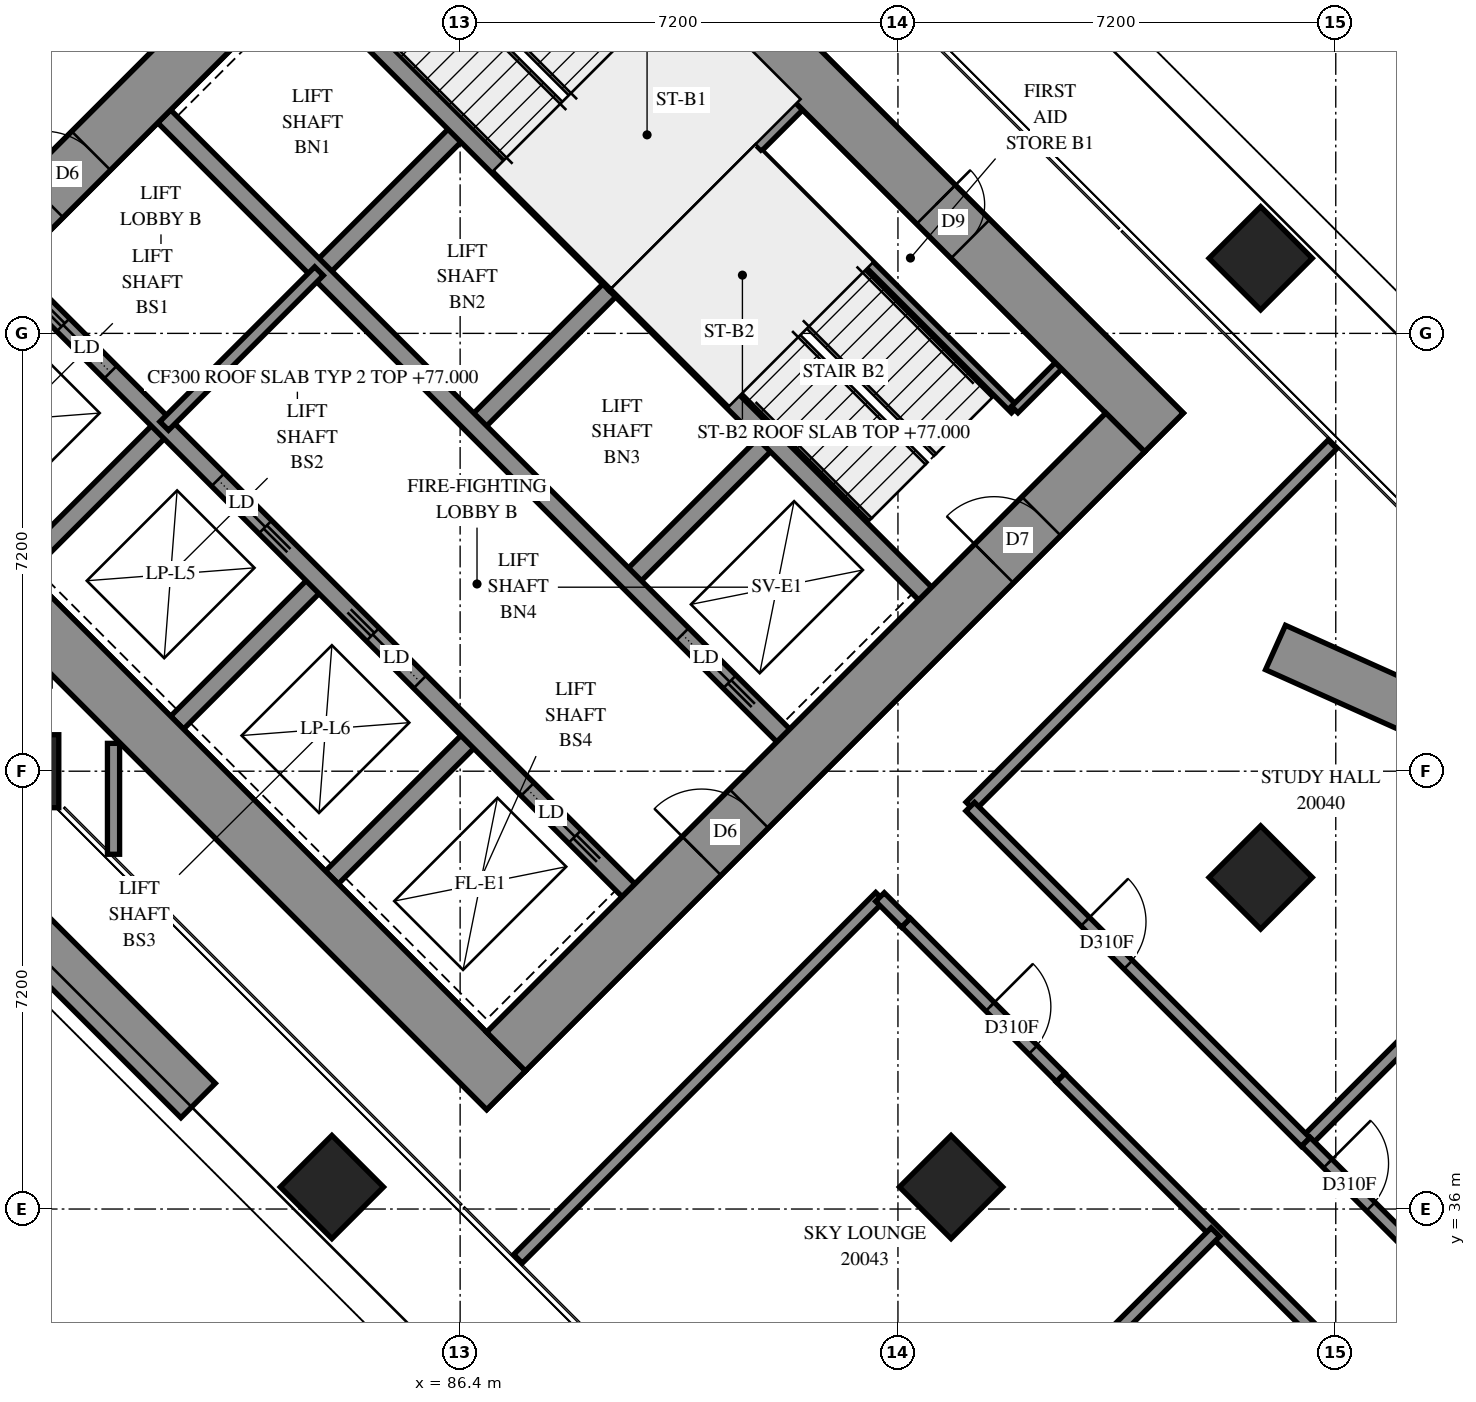
"""IFC4 building model, lengths in metres.
Left out: names, types, materials, properties, quantities, classifications, styles, units other than length and angle.
Written with IfcOpenShell. Run it as: python <this file> out.ifc"""

import sys

from ifc_helpers import new_model, si_unit, direction, frame, frame_2d, origin, origin_2d, place, context, subcontext, project, spatial, polyline, rectangle, outline, extrude, element, fill, save


model = new_model("IFC4")
c1 = context("Model", 3, precision=1e-05, world=origin(), true_north=direction((0.0, 1.0)))
c2 = subcontext(c1, "Body", "Model", "MODEL_VIEW")
j1 = project(units=[si_unit("LENGTHUNIT", "METRE"), si_unit("PLANEANGLEUNIT", "RADIAN")], contexts=[c1])
p1 = place(None, origin())
s1 = spatial("IfcSite", under=j1, at=p1, CompositionType="ELEMENT")
p2 = place(p1, origin())
s2 = spatial("IfcBuilding", under=s1, at=p2, CompositionType="ELEMENT")
p3 = place(p2, frame((0.0, 0.0, 77.0)))
s3 = spatial("IfcBuildingStorey", under=s2, at=p3, CompositionType="ELEMENT", Elevation=77.0)
for number, where, z_axis, x_axis in (
    (1, (79.2, 43.2, 0.0), (0.0, 0.0, 1.0), (1.0, 0.0, 0.0)),
    (2, (99.565, 51.635, 0.0), (0.0, 0.0, 1.0), (0.707, -0.707, 0.0)),
    (3, (84.291, 36.362, 0.0), (0.0, 0.0, 1.0), (0.707, -0.707, 0.0)),
    (4, (99.565, 41.453, 0.0), (0.0, 0.0, 1.0), (0.707, -0.707, 0.0)),
    (5, (94.474, 36.362, 0.0), (0.0, 0.0, 1.0), (0.707, -0.707, 0.0)),
):
    element("IfcColumn", number, at=place(p3, frame(where, z_axis=z_axis, x_axis=x_axis)), inside=s3, PredefinedType="COLUMN", context=c2, shape_type="SweptSolid", body=[
        extrude(rectangle(XDim=1.2, YDim=1.2, at=origin_2d()), origin(), (0.0, 0.0, 1.0), 3.9),
    ])
p4 = place(p3, frame((75.7, 49.408, -0.3), z_axis=(0.0, 0.0, 1.0), x_axis=(0.7071098676, -0.7071036948, 0.0)))
e6 = element("IfcWall", 6, at=p4, inside=s3, PredefinedType="SHEAR", context=c2, shape_type="SweptSolid", body=[
    extrude(rectangle(XDim=16.2, YDim=0.9, at=frame_2d((8.1, 0.0))), origin(), (0.0, 0.0, 1.0), 3.5),
])
p5 = place(p3, frame((86.519, 60.227, -0.3), z_axis=(0.0, 0.0, 1.0), x_axis=(0.7071036948, -0.7071098676, 0.0)))
e7 = element("IfcWall", 7, at=p5, inside=s3, PredefinedType="SHEAR", context=c2, shape_type="SweptSolid", body=[
    extrude(rectangle(XDim=16.2, YDim=0.9, at=frame_2d((8.1, 0.0))), origin(), (0.0, 0.0, 1.0), 3.5),
])
p6 = place(p5, frame((10.9, 0.0, 0.3)))
e8 = element("IfcOpeningElement", 8, at=p6, cuts=e7, PredefinedType="OPENING", context=c2, shape_type="SweptSolid", body=[
    extrude(rectangle(XDim=0.8, YDim=2.1, at=frame_2d((0.4, 1.05))), frame((0.0, 0.46, 0.0), z_axis=(0.0, -1.0, 0.0), x_axis=(1.0, 0.0, 0.0)), (0.0, 0.0, 1.0), 0.92),
])
p7 = place(p3, frame((76.336, 49.408, -0.3), z_axis=(0.0, 0.0, 1.0), x_axis=(0.7071067812, 0.7071067812, 0.0)))
e9 = element("IfcWall", 9, at=p7, inside=s3, PredefinedType="SHEAR", context=c2, shape_type="SweptSolid", body=[
    extrude(rectangle(XDim=14.4, YDim=0.9, at=frame_2d((7.2, 0.0))), origin(), (0.0, 0.0, 1.0), 3.5),
])
p8 = place(p7, frame((4.55, 0.0, 0.3)))
e10 = element("IfcOpeningElement", 10, at=p8, cuts=e9, PredefinedType="OPENING", context=c2, shape_type="SweptSolid", body=[
    extrude(rectangle(XDim=1.1, YDim=2.1, at=frame_2d((0.55, 1.05))), frame((0.0, 0.46, 0.0), z_axis=(0.0, -1.0, 0.0), x_axis=(1.0, 0.0, 0.0)), (0.0, 0.0, 1.0), 0.92),
])
p9 = place(p7, frame((11.35, 0.0, 0.3)))
e11 = element("IfcOpeningElement", 11, at=p9, cuts=e9, PredefinedType="OPENING", context=c2, shape_type="SweptSolid", body=[
    extrude(rectangle(XDim=1.1, YDim=2.1, at=frame_2d((0.55, 1.05))), frame((0.0, 0.46, 0.0), z_axis=(0.0, -1.0, 0.0), x_axis=(1.0, 0.0, 0.0)), (0.0, 0.0, 1.0), 0.92),
])
p10 = place(p3, frame((87.155, 38.589, -0.3), z_axis=(0.0, 0.0, 1.0), x_axis=(0.7071067812, 0.7071067812, 0.0)))
e12 = element("IfcWall", 12, at=p10, inside=s3, PredefinedType="SHEAR", context=c2, shape_type="SweptSolid", body=[
    extrude(rectangle(XDim=14.4, YDim=0.9, at=frame_2d((7.2, 0.0))), origin(), (0.0, 0.0, 1.0), 3.5),
])
p11 = place(p10, frame((4.55, 0.0, 0.3)))
e13 = element("IfcOpeningElement", 13, at=p11, cuts=e12, PredefinedType="OPENING", context=c2, shape_type="SweptSolid", body=[
    extrude(rectangle(XDim=1.1, YDim=2.1, at=frame_2d((0.55, 1.05))), frame((0.0, 0.46, 0.0), z_axis=(0.0, -1.0, 0.0), x_axis=(1.0, 0.0, 0.0)), (0.0, 0.0, 1.0), 0.92),
])
p12 = place(p10, frame((11.35, 0.0, 0.3)))
e14 = element("IfcOpeningElement", 14, at=p12, cuts=e12, PredefinedType="OPENING", context=c2, shape_type="SweptSolid", body=[
    extrude(rectangle(XDim=1.1, YDim=2.1, at=frame_2d((0.55, 1.05))), frame((0.0, 0.46, 0.0), z_axis=(0.0, -1.0, 0.0), x_axis=(1.0, 0.0, 0.0)), (0.0, 0.0, 1.0), 0.92),
])
for number, where, z_axis, x_axis in (
    (15, (79.2, 46.544, 0.0), (0.0, 0.0, 1.0), (0.707, 0.707, 0.0)),
    (16, (84.079, 51.423, 0.0), (0.0, 0.0, 1.0), (0.707, 0.707, 0.0)),
):
    element("IfcWall", number, at=place(p3, frame(where, z_axis=z_axis, x_axis=x_axis)), inside=s3, PredefinedType="SOLIDWALL", context=c2, shape_type="SweptSolid", body=[
        extrude(rectangle(XDim=3.3, YDim=0.3, at=frame_2d((1.65, 0.0))), origin(), (0.0, 0.0, 1.0), 3.9),
    ])
p13 = place(p3, frame((81.746, 43.999, 0.0), z_axis=(0.0, 0.0, 1.0), x_axis=(0.7071067812, 0.7071067812, 0.0)))
e17 = element("IfcWall", 17, at=p13, inside=s3, PredefinedType="SOLIDWALL", context=c2, shape_type="SweptSolid", body=[
    extrude(rectangle(XDim=3.3, YDim=0.3, at=frame_2d((1.65, 0.0))), origin(), (0.0, 0.0, 1.0), 3.9),
])
p14 = place(p3, frame((86.625, 48.878, 0.0), z_axis=(0.0, 0.0, 1.0), x_axis=(0.7071067812, 0.7071067812, 0.0)))
e18 = element("IfcWall", 18, at=p14, inside=s3, PredefinedType="SOLIDWALL", context=c2, shape_type="SweptSolid", body=[
    extrude(rectangle(XDim=3.3, YDim=0.3, at=frame_2d((1.65, 0.0))), origin(), (0.0, 0.0, 1.0), 3.9),
])
p15 = place(p3, frame((84.291, 41.453, 0.0), z_axis=(0.0, 0.0, 1.0), x_axis=(0.7071067812, 0.7071067812, 0.0)))
e19 = element("IfcWall", 19, at=p15, inside=s3, PredefinedType="SOLIDWALL", context=c2, shape_type="SweptSolid", body=[
    extrude(rectangle(XDim=3.3, YDim=0.3, at=frame_2d((1.65, 0.0))), origin(), (0.0, 0.0, 1.0), 3.9),
])
p16 = place(p3, frame((89.17, 46.332, 0.0), z_axis=(0.0, 0.0, 1.0), x_axis=(0.7071067812, 0.7071067812, 0.0)))
e20 = element("IfcWall", 20, at=p16, inside=s3, PredefinedType="SOLIDWALL", context=c2, shape_type="SweptSolid", body=[
    extrude(rectangle(XDim=3.3, YDim=0.3, at=frame_2d((1.65, 0.0))), origin(), (0.0, 0.0, 1.0), 3.9),
])
p17 = place(p3, frame((78.988, 51.423, 0.0), z_axis=(0.0, 0.0, 1.0), x_axis=(0.7071067812, -0.7071067812, 0.0)))
e21 = element("IfcWall", 21, at=p17, inside=s3, PredefinedType="SOLIDWALL", context=c2, shape_type="SweptSolid", body=[
    extrude(rectangle(XDim=14.4, YDim=0.3, at=frame_2d((7.2, 0.0))), origin(), (0.0, 0.0, 1.0), 3.9),
])
p18 = place(p17, frame((1.25, 0.0, 0.0)))
e22 = element("IfcOpeningElement", 22, at=p18, cuts=e21, PredefinedType="OPENING", context=c2, shape_type="SweptSolid", body=[
    extrude(rectangle(XDim=1.1, YDim=2.1, at=frame_2d((0.55, 1.05))), frame((0.0, 0.16, 0.0), z_axis=(0.0, -1.0, 0.0), x_axis=(1.0, 0.0, 0.0)), (0.0, 0.0, 1.0), 0.32),
])
p19 = place(p17, frame((4.85, 0.0, 0.0)))
e23 = element("IfcOpeningElement", 23, at=p19, cuts=e21, PredefinedType="OPENING", context=c2, shape_type="SweptSolid", body=[
    extrude(rectangle(XDim=1.1, YDim=2.1, at=frame_2d((0.55, 1.05))), frame((0.0, 0.16, 0.0), z_axis=(0.0, -1.0, 0.0), x_axis=(1.0, 0.0, 0.0)), (0.0, 0.0, 1.0), 0.32),
])
p20 = place(p17, frame((8.45, 0.0, 0.0)))
e24 = element("IfcOpeningElement", 24, at=p20, cuts=e21, PredefinedType="OPENING", context=c2, shape_type="SweptSolid", body=[
    extrude(rectangle(XDim=1.1, YDim=2.1, at=frame_2d((0.55, 1.05))), frame((0.0, 0.16, 0.0), z_axis=(0.0, -1.0, 0.0), x_axis=(1.0, 0.0, 0.0)), (0.0, 0.0, 1.0), 0.32),
])
p21 = place(p17, frame((12.05, 0.0, 0.0)))
e25 = element("IfcOpeningElement", 25, at=p21, cuts=e21, PredefinedType="OPENING", context=c2, shape_type="SweptSolid", body=[
    extrude(rectangle(XDim=1.1, YDim=2.1, at=frame_2d((0.55, 1.05))), frame((0.0, 0.16, 0.0), z_axis=(0.0, -1.0, 0.0), x_axis=(1.0, 0.0, 0.0)), (0.0, 0.0, 1.0), 0.32),
])
p22 = place(p3, frame((81.534, 53.969, 0.0), z_axis=(0.0, 0.0, 1.0), x_axis=(0.707103309, -0.7071102534, 0.0)))
e26 = element("IfcWall", 26, at=p22, inside=s3, PredefinedType="SOLIDWALL", context=c2, shape_type="SweptSolid", body=[
    extrude(rectangle(XDim=14.4, YDim=0.3, at=frame_2d((7.2, 0.0))), origin(), (0.0, 0.0, 1.0), 3.9),
])
p23 = place(p22, frame((12.05, 0.0, 0.0)))
e27 = element("IfcOpeningElement", 27, at=p23, cuts=e26, PredefinedType="OPENING", context=c2, shape_type="SweptSolid", body=[
    extrude(rectangle(XDim=1.1, YDim=2.1, at=frame_2d((0.55, 1.05))), frame((0.0, 0.16, 0.0), z_axis=(0.0, -1.0, 0.0), x_axis=(1.0, 0.0, 0.0)), (0.0, 0.0, 1.0), 0.32),
])
for number, where, z_axis, x_axis in (
    (28, (83.867, 56.302, 0.0), (0.0, 0.0, 1.0), (0.707, -0.707, 0.0)),
    (29, (88.958, 51.211, 0.0), (0.0, 0.0, 1.0), (0.707, -0.707, 0.0)),
):
    element("IfcWall", number, at=place(p3, frame(where, z_axis=z_axis, x_axis=x_axis)), inside=s3, PredefinedType="SOLIDWALL", context=c2, shape_type="SweptSolid", body=[
        extrude(rectangle(XDim=7.2, YDim=0.3, at=frame_2d((3.6, 0.0))), origin(), (0.0, 0.0, 1.0), 3.9),
    ])
p24 = place(p3, frame((88.958, 51.211, 0.0), z_axis=(0.0, 0.0, 1.0), x_axis=(0.7071067812, 0.7071067812, 0.0)))
e30 = element("IfcWall", 30, at=p24, inside=s3, PredefinedType="SOLIDWALL", context=c2, shape_type="SweptSolid", body=[
    extrude(rectangle(XDim=4.2, YDim=0.3, at=frame_2d((2.1, 0.0))), origin(), (0.0, 0.0, 1.0), 3.9),
])
p25 = place(p3, frame((78.875, 41.0, 0.0), z_axis=(0.0, 0.0, 1.0), x_axis=(0.7071067812, -0.7071067812, 0.0)))
e31 = element("IfcWall", 31, at=p25, inside=s3, PredefinedType="SOLIDWALL", context=c2, shape_type="SweptSolid", body=[
    extrude(rectangle(XDim=4.548, YDim=0.8, at=frame_2d((2.274, 0.0))), origin(), (0.0, 0.0, 1.0), 0.65),
])
p26 = place(p3, frame((105.255, 42.789, 0.0), z_axis=(0.0, 0.0, 1.0), x_axis=(-0.9122959724, 0.4095315113, 0.0)))
e32 = element("IfcWall", 32, at=p26, inside=s3, PredefinedType="SOLIDWALL", context=c2, shape_type="SweptSolid", body=[
    extrude(rectangle(XDim=5.97, YDim=0.8, at=frame_2d((2.985, 0.0))), origin(), (0.0, 0.0, 1.0), 0.65),
])
p27 = place(p3, frame((91.313, 53.354, 0.0), z_axis=(0.0, 0.0, 1.0), x_axis=(0.7071067812, -0.7071067812, 0.0)))
e33 = element("IfcWall", 33, at=p27, inside=s3, PredefinedType="PARTITIONING", context=c2, shape_type="SweptSolid", body=[
    extrude(rectangle(XDim=5.95, YDim=0.15, at=frame_2d((2.975, 0.0))), origin(), (0.0, 0.0, 1.0), 3.9),
])
p28 = place(p3, frame((95.52, 49.146, 0.0), z_axis=(0.0, 0.0, 1.0), x_axis=(0.7071067812, 0.7071067812, 0.0)))
e34 = element("IfcWall", 34, at=p28, inside=s3, PredefinedType="PARTITIONING", context=c2, shape_type="SweptSolid", body=[
    extrude(rectangle(XDim=1.02, YDim=0.15, at=frame_2d((0.51, 0.0))), origin(), (0.0, 0.0, 1.0), 3.9),
])
p29 = place(p3, frame((81.534, 48.878, 0.0), z_axis=(0.0, 0.0, 1.0), x_axis=(0.707092892, 0.7071206701, 0.0)))
e35 = element("IfcWall", 35, at=p29, inside=s3, PredefinedType="PARTITIONING", context=c2, shape_type="SweptSolid", body=[
    extrude(rectangle(XDim=3.6, YDim=0.2, at=frame_2d((1.8, 0.0))), origin(), (0.0, 0.0, 1.0), 3.9),
])
p30 = place(p3, frame((96.274, 38.162, 0.0), z_axis=(0.0, 0.0, 1.0), x_axis=(0.7071067812, -0.7071067812, 0.0)))
e36 = element("IfcWall", 36, at=p30, inside=s3, PredefinedType="PARTITIONING", context=c2, shape_type="SweptSolid", body=[
    extrude(outline(polyline([(0.0, -0.1), (13.069, -0.1), (13.069, 0.1), (0.0, 0.1), (0.0, -0.1)])), origin(), (0.0, 0.0, 1.0), 3.9),
])
p31 = place(p30, frame((11.053, 0.0, 0.0)))
e37 = element("IfcOpeningElement", 37, at=p31, cuts=e36, PredefinedType="OPENING", context=c2, shape_type="SweptSolid", body=[
    extrude(rectangle(XDim=1.0, YDim=2.1, at=frame_2d((0.5, 1.05))), frame((0.0, 0.11, 0.0), z_axis=(0.0, -1.0, 0.0), x_axis=(1.0, 0.0, 0.0)), (0.0, 0.0, 1.0), 0.22),
])
for number, where, z_axis, x_axis in (
    (38, (100.307, 37.105, 0.0), (0.0, 0.0, 1.0), (0.707, 0.707, 0.0)),
    (39, (92.867, 29.665, 0.0), (0.0, 0.0, 1.0), (0.707, 0.707, 0.0)),
    (40, (87.351, 35.181, 0.0), (0.0, 0.0, 1.0), (0.707, 0.707, 0.0)),
    (41, (94.791, 42.621, 0.0), (0.0, 0.0, 1.0), (0.707, 0.707, 0.0)),
):
    element("IfcWall", number, at=place(p3, frame(where, z_axis=z_axis, x_axis=x_axis)), inside=s3, PredefinedType="PARTITIONING", context=c2, shape_type="SweptSolid", body=[
        extrude(rectangle(XDim=8.42, YDim=0.2, at=frame_2d((4.21, 0.0))), origin(), (0.0, 0.0, 1.0), 3.9),
    ])
p32 = place(p3, frame((94.788, 42.617, 0.0), z_axis=(0.0, 0.0, 1.0), x_axis=(0.7071067812, -0.7071067812, 0.0)))
e42 = element("IfcWall", 42, at=p32, inside=s3, PredefinedType="PARTITIONING", context=c2, shape_type="SweptSolid", body=[
    extrude(rectangle(XDim=7.801, YDim=0.2, at=frame_2d((3.9, 0.0))), origin(), (0.0, 0.0, 1.0), 3.9),
])
p33 = place(p32, frame((2.674, 0.0, 0.0)))
e43 = element("IfcOpeningElement", 43, at=p33, cuts=e42, PredefinedType="OPENING", context=c2, shape_type="SweptSolid", body=[
    extrude(rectangle(XDim=1.0, YDim=2.1, at=frame_2d((0.5, 1.05))), frame((0.0, 0.11, 0.0), z_axis=(0.0, -1.0, 0.0), x_axis=(1.0, 0.0, 0.0)), (0.0, 0.0, 1.0), 0.22),
])
p34 = place(p3, frame((93.732, 40.71, 0.0), z_axis=(0.0, 0.0, 1.0), x_axis=(0.7068288851, -0.7073845681, 0.0)))
e44 = element("IfcWall", 44, at=p34, inside=s3, PredefinedType="PARTITIONING", context=c2, shape_type="SweptSolid", body=[
    extrude(rectangle(XDim=3.599, YDim=0.2, at=frame_2d((1.8, 0.0))), origin(), (0.0, 0.0, 1.0), 3.9),
])
p35 = place(p34, frame((1.956, 0.0, 0.0)))
e45 = element("IfcOpeningElement", 45, at=p35, cuts=e44, PredefinedType="OPENING", context=c2, shape_type="SweptSolid", body=[
    extrude(rectangle(XDim=1.0, YDim=2.1, at=frame_2d((0.5, 1.05))), frame((0.0, 0.11, 0.0), z_axis=(0.0, -1.0, 0.0), x_axis=(1.0, 0.0, 0.0)), (0.0, 0.0, 1.0), 0.22),
])
p36 = place(p3, frame((100.31, 37.106, 0.0), z_axis=(0.0, 0.0, 1.0), x_axis=(0.7073845681, -0.7068288851, 0.0)))
e46 = element("IfcWall", 46, at=p36, inside=s3, PredefinedType="PARTITIONING", context=c2, shape_type="SweptSolid", body=[
    extrude(rectangle(XDim=3.599, YDim=0.2, at=frame_2d((1.8, 0.0))), origin(), (0.0, 0.0, 1.0), 3.9),
])
p37 = place(p36, frame((0.507, 0.0, 0.0)))
e47 = element("IfcOpeningElement", 47, at=p37, cuts=e46, PredefinedType="OPENING", context=c2, shape_type="SweptSolid", body=[
    extrude(rectangle(XDim=1.0, YDim=2.1, at=frame_2d((0.5, 1.05))), frame((0.0, 0.11, 0.0), z_axis=(0.0, -1.0, 0.0), x_axis=(1.0, 0.0, 0.0)), (0.0, 0.0, 1.0), 0.22),
])
p38 = place(p3, frame((80.7, 41.834, 0.0), z_axis=(0.0, 0.0, 1.0), x_axis=(0.0, 1.0, 0.0)))
e48 = element("IfcWall", 48, at=p38, inside=s3, PredefinedType="PARTITIONING", context=c2, shape_type="SweptSolid", body=[
    extrude(rectangle(XDim=1.824, YDim=0.2, at=frame_2d((0.912, 0.0))), origin(), (0.0, 0.0, 1.0), 3.9),
])
p39 = place(p3, frame((93.305, 41.131, 0.0), z_axis=(0.0, 0.0, 1.0), x_axis=(0.7071067812, -0.7071067812, 0.0)))
e49 = element("IfcWall", 49, at=p39, inside=s3, PredefinedType="PARTITIONING", context=c2, shape_type="SweptSolid", body=[
    extrude(rectangle(XDim=0.6, YDim=0.2, at=frame_2d((0.3, 0.0))), origin(), (0.0, 0.0, 1.0), 3.9),
])
p40 = place(p6, origin())
e50 = element("IfcDoor", 50, at=p40, inside=s3, OperationType="SINGLE_SWING_RIGHT", PredefinedType="DOOR", context=c2, shape_type="SweptSolid", body=[
    extrude(rectangle(XDim=0.8, YDim=2.1, at=frame_2d((0.4, 1.05))), frame((0.0, -0.39, 0.0), z_axis=(0.0, -1.0, 0.0), x_axis=(1.0, 0.0, 0.0)), (0.0, 0.0, 1.0), 0.05),
])
fill(e8, e50)
p41 = place(p8, origin())
e51 = element("IfcDoor", 51, at=p41, inside=s3, OperationType="DOUBLE_DOOR_SINGLE_SWING", PredefinedType="DOOR", context=c2, shape_type="SweptSolid", body=[
    extrude(rectangle(XDim=1.1, YDim=2.1, at=frame_2d((0.55, 1.05))), frame((0.0, 0.025, 0.0), z_axis=(0.0, -1.0, 0.0), x_axis=(1.0, 0.0, 0.0)), (0.0, 0.0, 1.0), 0.05),
])
fill(e10, e51)
p42 = place(p11, origin())
e52 = element("IfcDoor", 52, at=p42, inside=s3, OperationType="DOUBLE_DOOR_SINGLE_SWING", PredefinedType="DOOR", context=c2, shape_type="SweptSolid", body=[
    extrude(rectangle(XDim=1.1, YDim=2.1, at=frame_2d((0.55, 1.05))), frame((0.0, 0.025, 0.0), z_axis=(0.0, -1.0, 0.0), x_axis=(1.0, 0.0, 0.0)), (0.0, 0.0, 1.0), 0.05),
])
fill(e13, e52)
p43 = place(p12, origin())
e53 = element("IfcDoor", 53, at=p43, inside=s3, OperationType="SINGLE_SWING_RIGHT", PredefinedType="DOOR", context=c2, shape_type="SweptSolid", body=[
    extrude(rectangle(XDim=1.1, YDim=2.1, at=frame_2d((0.55, 1.05))), frame((0.0, 0.025, 0.0), z_axis=(0.0, -1.0, 0.0), x_axis=(1.0, 0.0, 0.0)), (0.0, 0.0, 1.0), 0.05),
])
fill(e14, e53)
p44 = place(p18, origin())
e54 = element("IfcDoor", 54, at=p44, inside=s3, OperationType="SLIDING_TO_LEFT", PredefinedType="DOOR", context=c2, shape_type="SweptSolid", body=[
    extrude(rectangle(XDim=1.1, YDim=2.1, at=frame_2d((0.55, 1.05))), frame((0.0, 0.025, 0.0), z_axis=(0.0, -1.0, 0.0), x_axis=(1.0, 0.0, 0.0)), (0.0, 0.0, 1.0), 0.05),
])
fill(e22, e54)
p45 = place(p19, origin())
e55 = element("IfcDoor", 55, at=p45, inside=s3, OperationType="SLIDING_TO_RIGHT", PredefinedType="DOOR", context=c2, shape_type="SweptSolid", body=[
    extrude(rectangle(XDim=1.1, YDim=2.1, at=frame_2d((0.55, 1.05))), frame((0.0, 0.025, 0.0), z_axis=(0.0, -1.0, 0.0), x_axis=(1.0, 0.0, 0.0)), (0.0, 0.0, 1.0), 0.05),
])
fill(e23, e55)
p46 = place(p20, origin())
e56 = element("IfcDoor", 56, at=p46, inside=s3, OperationType="SLIDING_TO_LEFT", PredefinedType="DOOR", context=c2, shape_type="SweptSolid", body=[
    extrude(rectangle(XDim=1.1, YDim=2.1, at=frame_2d((0.55, 1.05))), frame((0.0, 0.025, 0.0), z_axis=(0.0, -1.0, 0.0), x_axis=(1.0, 0.0, 0.0)), (0.0, 0.0, 1.0), 0.05),
])
fill(e24, e56)
p47 = place(p21, origin())
e57 = element("IfcDoor", 57, at=p47, inside=s3, OperationType="SLIDING_TO_RIGHT", PredefinedType="DOOR", context=c2, shape_type="SweptSolid", body=[
    extrude(rectangle(XDim=1.1, YDim=2.1, at=frame_2d((0.55, 1.05))), frame((0.0, 0.025, 0.0), z_axis=(0.0, -1.0, 0.0), x_axis=(1.0, 0.0, 0.0)), (0.0, 0.0, 1.0), 0.05),
])
fill(e25, e57)
p48 = place(p23, origin())
e58 = element("IfcDoor", 58, at=p48, inside=s3, OperationType="SLIDING_TO_RIGHT", PredefinedType="DOOR", context=c2, shape_type="SweptSolid", body=[
    extrude(rectangle(XDim=1.1, YDim=2.1, at=frame_2d((0.55, 1.05))), frame((0.0, 0.025, 0.0), z_axis=(0.0, -1.0, 0.0), x_axis=(1.0, 0.0, 0.0)), (0.0, 0.0, 1.0), 0.05),
])
fill(e27, e58)
p49 = place(p33, origin())
e59 = element("IfcDoor", 59, at=p49, inside=s3, OperationType="SINGLE_SWING_RIGHT", PredefinedType="DOOR", context=c2, shape_type="SweptSolid", body=[
    extrude(rectangle(XDim=1.0, YDim=2.1, at=frame_2d((0.5, 1.05))), frame((0.0, 0.025, 0.0), z_axis=(0.0, -1.0, 0.0), x_axis=(1.0, 0.0, 0.0)), (0.0, 0.0, 1.0), 0.05),
])
fill(e43, e59)
p50 = place(p37, origin())
e60 = element("IfcDoor", 60, at=p50, inside=s3, OperationType="SINGLE_SWING_RIGHT", PredefinedType="DOOR", context=c2, shape_type="SweptSolid", body=[
    extrude(rectangle(XDim=1.0, YDim=2.1, at=frame_2d((0.5, 1.05))), frame((0.0, 0.025, 0.0), z_axis=(0.0, -1.0, 0.0), x_axis=(1.0, 0.0, 0.0)), (0.0, 0.0, 1.0), 0.05),
])
fill(e47, e60)
p51 = place(p35, origin())
e61 = element("IfcDoor", 61, at=p51, inside=s3, OperationType="SINGLE_SWING_LEFT", PredefinedType="DOOR", context=c2, shape_type="SweptSolid", body=[
    extrude(rectangle(XDim=1.0, YDim=2.1, at=frame_2d((0.5, 1.05))), frame((0.0, 0.025, 0.0), z_axis=(0.0, -1.0, 0.0), x_axis=(1.0, 0.0, 0.0)), (0.0, 0.0, 1.0), 0.05),
])
fill(e45, e61)
save(model, sys.argv[1])
